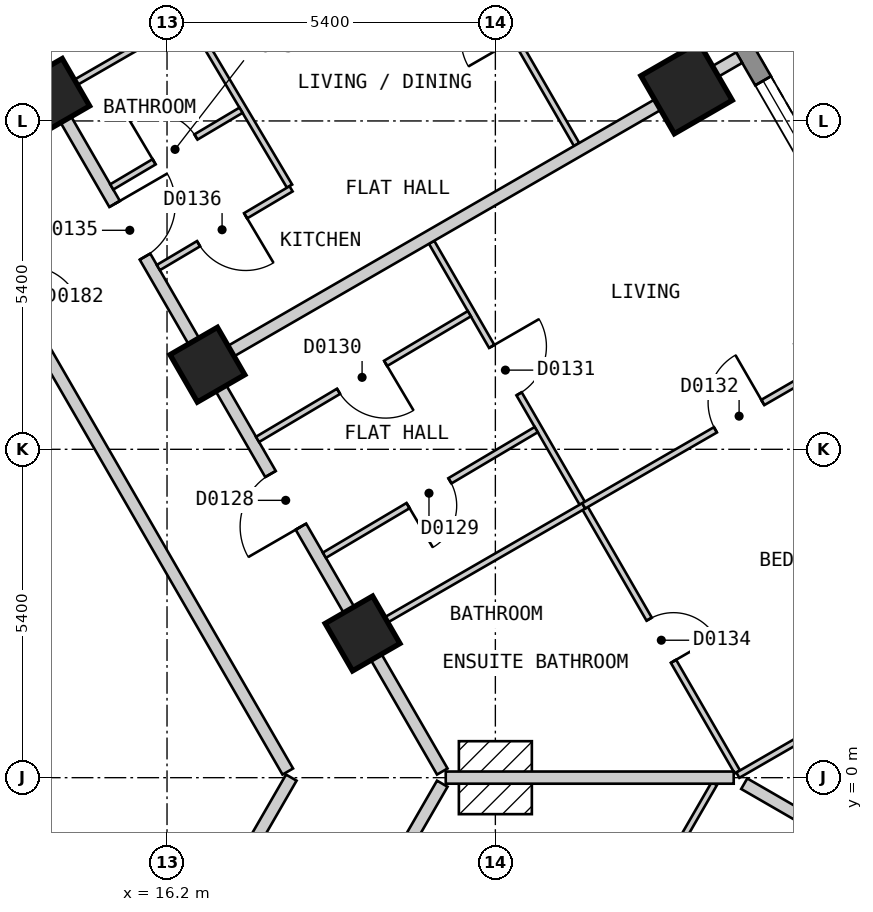
"""IFC4 building model, lengths in metres.
Left out: names, types, materials, properties, quantities, classifications, styles, units other than length and angle.
Written with IfcOpenShell. Run it as: python <this file> out.ifc"""

import sys

from ifc_helpers import new_model, si_unit, direction, frame, frame_2d, origin, origin_2d, place, context, subcontext, project, spatial, polyline, rectangle, outline, extrude, element, fill, save


model = new_model("IFC4")
c1 = context("Model", 3, precision=1e-05, world=origin(), true_north=direction((0.0, 1.0)))
c2 = subcontext(c1, "Body", "Model", "MODEL_VIEW")
j1 = project(units=[si_unit("LENGTHUNIT", "METRE"), si_unit("PLANEANGLEUNIT", "RADIAN")], contexts=[c1])
p1 = place(None, origin())
s1 = spatial("IfcSite", under=j1, at=p1, CompositionType="ELEMENT")
p2 = place(p1, origin())
s2 = spatial("IfcBuilding", under=s1, at=p2, CompositionType="ELEMENT")
p3 = place(p2, frame((0.0, 0.0, 23.4)))
s3 = spatial("IfcBuildingStorey", under=s2, at=p3, CompositionType="ELEMENT", Elevation=23.4)
p4 = place(p3, frame((24.745, 11.341, 0.0), z_axis=(0.0, 0.0, 1.0), x_axis=(-0.499984884929, 0.866034130299, 0.0)))
e1 = element("IfcColumn", 1, at=p4, inside=s3, PredefinedType="COLUMN", context=c2, shape_type="SweptSolid", body=[
    extrude(rectangle(XDim=1.1, YDim=1.1, at=origin_2d()), origin(), (0.0, 0.0, 1.0), 3.0),
])
for number, where, z_axis, x_axis in (
    (2, (19.416, 2.371, 0.0), (0.0, 0.0, 1.0), (-0.5, 0.866, 0.0)),
    (3, (16.864, 6.791, 0.0), (0.0, 0.0, 1.0), (-0.5, 0.866, 0.0)),
    (4, (14.312, 11.211, 0.0), (0.0, 0.0, 1.0), (-0.5, 0.866, 0.0)),
):
    element("IfcColumn", number, at=place(p3, frame(where, z_axis=z_axis, x_axis=x_axis)), inside=s3, PredefinedType="COLUMN", context=c2, shape_type="SweptSolid", body=[
        extrude(rectangle(XDim=0.9, YDim=0.9, at=origin_2d()), origin(), (0.0, 0.0, 1.0), 3.0),
    ])
p5 = place(p3, frame((31.22, 2.425, 0.0), z_axis=(0.0, 0.0, 1.0), x_axis=(-0.500001938803, 0.866024284413, 0.0)))
e5 = element("IfcWall", 5, at=p5, inside=s3, PredefinedType="SOLIDWALL", context=c2, shape_type="SweptSolid", body=[
    extrude(outline(polyline([(0.0, -0.15), (27.02, -0.15), (26.94, 0.15), (0.08, 0.15), (0.0, -0.15)])), origin(), (0.0, 0.0, 1.0), 2.7),
])
p6 = place(p5, frame((1.277, 0.0, 0.15)))
e6 = element("IfcOpeningElement", 6, at=p6, cuts=e5, PredefinedType="OPENING", context=c2, shape_type="SweptSolid", body=[
    extrude(rectangle(XDim=1.5, YDim=2.1, at=frame_2d((0.75, 1.05))), frame((0.0, 0.16, 0.0), z_axis=(0.0, -1.0, 0.0), x_axis=(1.0, 0.0, 0.0)), (0.0, 0.0, 1.0), 0.32),
])
p7 = place(p5, frame((3.829, 0.0, 0.15)))
e7 = element("IfcOpeningElement", 7, at=p7, cuts=e5, PredefinedType="OPENING", context=c2, shape_type="SweptSolid", body=[
    extrude(rectangle(XDim=1.5, YDim=2.1, at=frame_2d((0.75, 1.05))), frame((0.0, 0.16, 0.0), z_axis=(0.0, -1.0, 0.0), x_axis=(1.0, 0.0, 0.0)), (0.0, 0.0, 1.0), 0.32),
])
p8 = place(p5, frame((6.382, 0.0, 0.15)))
e8 = element("IfcOpeningElement", 8, at=p8, cuts=e5, PredefinedType="OPENING", context=c2, shape_type="SweptSolid", body=[
    extrude(rectangle(XDim=1.5, YDim=2.1, at=frame_2d((0.75, 1.05))), frame((0.0, 0.16, 0.0), z_axis=(0.0, -1.0, 0.0), x_axis=(1.0, 0.0, 0.0)), (0.0, 0.0, 1.0), 0.32),
])
p9 = place(p5, frame((8.933, 0.0, 0.15)))
e9 = element("IfcOpeningElement", 9, at=p9, cuts=e5, PredefinedType="OPENING", context=c2, shape_type="SweptSolid", body=[
    extrude(rectangle(XDim=1.5, YDim=2.1, at=frame_2d((0.75, 1.05))), frame((0.0, 0.16, 0.0), z_axis=(0.0, -1.0, 0.0), x_axis=(1.0, 0.0, 0.0)), (0.0, 0.0, 1.0), 0.32),
])
p10 = place(p5, frame((11.485, 0.0, 0.15)))
e10 = element("IfcOpeningElement", 10, at=p10, cuts=e5, PredefinedType="OPENING", context=c2, shape_type="SweptSolid", body=[
    extrude(rectangle(XDim=1.5, YDim=2.1, at=frame_2d((0.75, 1.05))), frame((0.0, 0.16, 0.0), z_axis=(0.0, -1.0, 0.0), x_axis=(1.0, 0.0, 0.0)), (0.0, 0.0, 1.0), 0.32),
])
p11 = place(p5, frame((14.037, 0.0, 0.15)))
e11 = element("IfcOpeningElement", 11, at=p11, cuts=e5, PredefinedType="OPENING", context=c2, shape_type="SweptSolid", body=[
    extrude(rectangle(XDim=1.5, YDim=2.1, at=frame_2d((0.75, 1.05))), frame((0.0, 0.16, 0.0), z_axis=(0.0, -1.0, 0.0), x_axis=(1.0, 0.0, 0.0)), (0.0, 0.0, 1.0), 0.32),
])
p12 = place(p5, frame((16.589, 0.0, 0.15)))
e12 = element("IfcOpeningElement", 12, at=p12, cuts=e5, PredefinedType="OPENING", context=c2, shape_type="SweptSolid", body=[
    extrude(rectangle(XDim=1.5, YDim=2.1, at=frame_2d((0.75, 1.05))), frame((0.0, 0.16, 0.0), z_axis=(0.0, -1.0, 0.0), x_axis=(1.0, 0.0, 0.0)), (0.0, 0.0, 1.0), 0.32),
])
p13 = place(p5, frame((19.141, 0.0, 0.15)))
e13 = element("IfcOpeningElement", 13, at=p13, cuts=e5, PredefinedType="OPENING", context=c2, shape_type="SweptSolid", body=[
    extrude(rectangle(XDim=1.5, YDim=2.1, at=frame_2d((0.75, 1.05))), frame((0.0, 0.16, 0.0), z_axis=(0.0, -1.0, 0.0), x_axis=(1.0, 0.0, 0.0)), (0.0, 0.0, 1.0), 0.32),
])
p14 = place(p5, frame((21.693, 0.0, 0.15)))
e14 = element("IfcOpeningElement", 14, at=p14, cuts=e5, PredefinedType="OPENING", context=c2, shape_type="SweptSolid", body=[
    extrude(rectangle(XDim=1.5, YDim=2.1, at=frame_2d((0.75, 1.05))), frame((0.0, 0.16, 0.0), z_axis=(0.0, -1.0, 0.0), x_axis=(1.0, 0.0, 0.0)), (0.0, 0.0, 1.0), 0.32),
])
p15 = place(p5, frame((24.244, 0.0, 0.15)))
e15 = element("IfcOpeningElement", 15, at=p15, cuts=e5, PredefinedType="OPENING", context=c2, shape_type="SweptSolid", body=[
    extrude(rectangle(XDim=1.5, YDim=2.1, at=frame_2d((0.75, 1.05))), frame((0.0, 0.16, 0.0), z_axis=(0.0, -1.0, 0.0), x_axis=(1.0, 0.0, 0.0)), (0.0, 0.0, 1.0), 0.32),
])
p16 = place(p3, frame((9.18, 15.7, 0.0), z_axis=(0.0, 0.0, 1.0), x_axis=(0.500003652032, -0.866023295272, 0.0)))
e16 = element("IfcWall", 16, at=p16, inside=s3, PredefinedType="PARTITIONING", context=c2, shape_type="SweptSolid", body=[
    extrude(rectangle(XDim=18.012, YDim=0.2, at=frame_2d((9.006, 0.0))), origin(), (0.0, 0.0, 1.0), 2.7),
])
p17 = place(p16, frame((8.556, 0.0, 0.0)))
e17 = element("IfcOpeningElement", 17, at=p17, cuts=e16, PredefinedType="OPENING", context=c2, shape_type="SweptSolid", body=[
    extrude(rectangle(XDim=0.9, YDim=2.1, at=frame_2d((0.45, 1.05))), frame((0.0, 0.11, 0.0), z_axis=(0.0, -1.0, 0.0), x_axis=(1.0, 0.0, 0.0)), (0.0, 0.0, 1.0), 0.22),
])
p18 = place(p3, frame((10.45, 17.9, 0.0), z_axis=(0.0, 0.0, 1.0), x_axis=(0.500034352617, -0.866005569383, 0.0)))
e18 = element("IfcWall", 18, at=p18, inside=s3, PredefinedType="PARTITIONING", context=c2, shape_type="SweptSolid", body=[
    extrude(rectangle(XDim=20.553, YDim=0.2, at=frame_2d((10.276, 0.0))), origin(), (0.0, 0.0, 1.0), 2.7),
])
p19 = place(p18, frame((14.903, 0.0, 0.0)))
e19 = element("IfcOpeningElement", 19, at=p19, cuts=e18, PredefinedType="OPENING", context=c2, shape_type="SweptSolid", body=[
    extrude(rectangle(XDim=1.0, YDim=2.1, at=frame_2d((0.5, 1.05))), frame((0.0, 0.11, 0.0), z_axis=(0.0, -1.0, 0.0), x_axis=(1.0, 0.0, 0.0)), (0.0, 0.0, 1.0), 0.22),
])
p20 = place(p18, frame((9.775, 0.0, 0.0)))
e20 = element("IfcOpeningElement", 20, at=p20, cuts=e18, PredefinedType="OPENING", context=c2, shape_type="SweptSolid", body=[
    extrude(rectangle(XDim=1.0, YDim=2.1, at=frame_2d((0.5, 1.05))), frame((0.0, 0.11, 0.0), z_axis=(0.0, -1.0, 0.0), x_axis=(1.0, 0.0, 0.0)), (0.0, 0.0, 1.0), 0.22),
])
p21 = place(p3, frame((15.6, -4.579, 0.0), z_axis=(0.0, 0.0, 1.0), x_axis=(0.499927597274, 0.866067201483, 0.0)))
e21 = element("IfcWall", 21, at=p21, inside=s3, PredefinedType="PARTITIONING", context=c2, shape_type="SweptSolid", body=[
    extrude(rectangle(XDim=5.288, YDim=0.2, at=frame_2d((2.644, 0.0))), origin(), (0.0, 0.0, 1.0), 2.7),
])
p22 = place(p3, frame((16.914, -6.703, 0.0), z_axis=(0.0, 0.0, 1.0), x_axis=(0.50003007663, 0.866008038338, 0.0)))
e22 = element("IfcWall", 22, at=p22, inside=s3, PredefinedType="PARTITIONING", context=c2, shape_type="SweptSolid", body=[
    extrude(rectangle(XDim=7.625, YDim=0.2, at=frame_2d((3.813, 0.0))), origin(), (0.0, 0.0, 1.0), 2.7),
])
p23 = place(p22, frame((1.952, 0.0, 0.0)))
e23 = element("IfcOpeningElement", 23, at=p23, cuts=e22, PredefinedType="OPENING", context=c2, shape_type="SweptSolid", body=[
    extrude(rectangle(XDim=1.0, YDim=2.1, at=frame_2d((0.5, 1.05))), frame((0.0, 0.11, 0.0), z_axis=(0.0, -1.0, 0.0), x_axis=(1.0, 0.0, 0.0)), (0.0, 0.0, 1.0), 0.22),
])
p24 = place(p3, frame((16.589, 12.468, 0.0), z_axis=(0.0, 0.0, 1.0), x_axis=(0.510331599186, -0.859977708358, 0.0)))
e24 = element("IfcWall", 24, at=p24, inside=s3, PredefinedType="PARTITIONING", context=c2, shape_type="SweptSolid", body=[
    extrude(rectangle(XDim=3.186, YDim=0.1, at=frame_2d((1.593, 0.0))), origin(), (0.0, 0.0, 1.0), 2.7),
])
p25 = place(p3, frame((20.551, 8.805, 0.0), z_axis=(0.0, 0.0, 1.0), x_axis=(0.499984387913, -0.86603441724, 0.0)))
e25 = element("IfcWall", 25, at=p25, inside=s3, PredefinedType="PARTITIONING", context=c2, shape_type="SweptSolid", body=[
    extrude(rectangle(XDim=10.058, YDim=0.1, at=frame_2d((5.029, 0.0))), origin(), (0.0, 0.0, 1.0), 2.7),
])
p26 = place(p25, frame((1.978, 0.0, 0.0)))
e26 = element("IfcOpeningElement", 26, at=p26, cuts=e25, PredefinedType="OPENING", context=c2, shape_type="SweptSolid", body=[
    extrude(rectangle(XDim=0.9, YDim=2.1, at=frame_2d((0.45, 1.05))), frame((0.0, 0.06, 0.0), z_axis=(0.0, -1.0, 0.0), x_axis=(1.0, 0.0, 0.0)), (0.0, 0.0, 1.0), 0.12),
])
p27 = place(p25, frame((7.157, 0.0, 0.0)))
e27 = element("IfcOpeningElement", 27, at=p27, cuts=e25, PredefinedType="OPENING", context=c2, shape_type="SweptSolid", body=[
    extrude(rectangle(XDim=0.8, YDim=2.1, at=frame_2d((0.4, 1.05))), frame((0.0, 0.06, 0.0), z_axis=(0.0, -1.0, 0.0), x_axis=(1.0, 0.0, 0.0)), (0.0, 0.0, 1.0), 0.12),
])
p28 = place(p3, frame((20.46, 14.703, 0.0), z_axis=(0.0, 0.0, 1.0), x_axis=(0.499903082856, -0.866081351693, 0.0)))
e28 = element("IfcWall", 28, at=p28, inside=s3, PredefinedType="PARTITIONING", context=c2, shape_type="SweptSolid", body=[
    extrude(rectangle(XDim=4.953, YDim=0.1, at=frame_2d((2.477, 0.0))), origin(), (0.0, 0.0, 1.0), 2.7),
])
p29 = place(p28, frame((2.052, 0.0, 0.0)))
e29 = element("IfcOpeningElement", 29, at=p29, cuts=e28, PredefinedType="OPENING", context=c2, shape_type="SweptSolid", body=[
    extrude(rectangle(XDim=0.9, YDim=2.1, at=frame_2d((0.45, 1.05))), frame((0.0, 0.06, 0.0), z_axis=(0.0, -1.0, 0.0), x_axis=(1.0, 0.0, 0.0)), (0.0, 0.0, 1.0), 0.12),
])
p30 = place(p3, frame((22.797, -4.263, 0.0), z_axis=(0.0, 0.0, 1.0), x_axis=(0.499820637322, 0.866128934112, 0.0)))
e30 = element("IfcWall", 30, at=p30, inside=s3, PredefinedType="PARTITIONING", context=c2, shape_type="SweptSolid", body=[
    extrude(rectangle(XDim=4.807, YDim=0.1, at=frame_2d((2.404, 0.0))), origin(), (0.0, 0.0, 1.0), 2.7),
])
p31 = place(p30, frame((2.037, 0.0, 0.0)))
e31 = element("IfcOpeningElement", 31, at=p31, cuts=e30, PredefinedType="OPENING", context=c2, shape_type="SweptSolid", body=[
    extrude(rectangle(XDim=0.8, YDim=2.1, at=frame_2d((0.4, 1.05))), frame((0.0, 0.06, 0.0), z_axis=(0.0, -1.0, 0.0), x_axis=(1.0, 0.0, 0.0)), (0.0, 0.0, 1.0), 0.12),
])
p32 = place(p3, frame((19.503, 2.421, 0.0), z_axis=(0.0, 0.0, 1.0), x_axis=(0.866083434238, 0.499899474834, 0.0)))
e32 = element("IfcWall", 32, at=p32, inside=s3, PredefinedType="PARTITIONING", context=c2, shape_type="SweptSolid", body=[
    extrude(rectangle(XDim=4.099, YDim=0.1, at=frame_2d((2.049, 0.0))), origin(), (0.0, 0.0, 1.0), 2.7),
])
p33 = place(p3, frame((25.588, 0.041, 0.0), z_axis=(0.0, 0.0, 1.0), x_axis=(0.866113484451, 0.499847408768, 0.0)))
e33 = element("IfcWall", 33, at=p33, inside=s3, PredefinedType="PARTITIONING", context=c2, shape_type="SweptSolid", body=[
    extrude(rectangle(XDim=5.92, YDim=0.1, at=frame_2d((2.96, 0.0))), origin(), (0.0, 0.0, 1.0), 2.7),
])
p34 = place(p33, frame((2.51, 0.0, 0.0)))
e34 = element("IfcOpeningElement", 34, at=p34, cuts=e33, PredefinedType="OPENING", context=c2, shape_type="SweptSolid", body=[
    extrude(rectangle(XDim=0.9, YDim=2.1, at=frame_2d((0.45, 1.05))), frame((0.0, 0.06, 0.0), z_axis=(0.0, -1.0, 0.0), x_axis=(1.0, 0.0, 0.0)), (0.0, 0.0, 1.0), 0.12),
])
p35 = place(p3, frame((14.399, 11.261, 0.0), z_axis=(0.0, 0.0, 1.0), x_axis=(0.866022959057, 0.500004234368, 0.0)))
e35 = element("IfcWall", 35, at=p35, inside=s3, PredefinedType="PARTITIONING", context=c2, shape_type="SweptSolid", body=[
    extrude(rectangle(XDim=10.0, YDim=0.1, at=frame_2d((5.0, 0.0))), origin(), (0.0, 0.0, 1.0), 2.7),
])
p36 = place(p35, frame((4.775, 0.0, 0.0)))
e36 = element("IfcOpeningElement", 36, at=p36, cuts=e35, PredefinedType="OPENING", context=c2, shape_type="SweptSolid", body=[
    extrude(rectangle(XDim=0.9, YDim=2.1, at=frame_2d((0.45, 1.05))), frame((0.0, 0.06, 0.0), z_axis=(0.0, -1.0, 0.0), x_axis=(1.0, 0.0, 0.0)), (0.0, 0.0, 1.0), 0.12),
])
p37 = place(p3, frame((17.688, 5.563, 0.0), z_axis=(0.0, 0.0, 1.0), x_axis=(0.860050619918, 0.510208713351, 0.0)))
e37 = element("IfcWall", 37, at=p37, inside=s3, PredefinedType="PARTITIONING", context=c2, shape_type="SweptSolid", body=[
    extrude(rectangle(XDim=4.051, YDim=0.1, at=frame_2d((2.025, 0.0))), origin(), (0.0, 0.0, 1.0), 2.7),
])
p38 = place(p37, frame((1.55, 0.0, 0.0)))
e38 = element("IfcOpeningElement", 38, at=p38, cuts=e37, PredefinedType="OPENING", context=c2, shape_type="SweptSolid", body=[
    extrude(rectangle(XDim=0.9, YDim=2.1, at=frame_2d((0.45, 1.05))), frame((0.0, 0.06, 0.0), z_axis=(0.0, -1.0, 0.0), x_axis=(1.0, 0.0, 0.0)), (0.0, 0.0, 1.0), 0.12),
])
p39 = place(p3, frame((18.788, 3.658, 0.0), z_axis=(0.0, 0.0, 1.0), x_axis=(0.860114269096, 0.510101405701, 0.0)))
e39 = element("IfcWall", 39, at=p39, inside=s3, PredefinedType="PARTITIONING", context=c2, shape_type="SweptSolid", body=[
    extrude(rectangle(XDim=4.051, YDim=0.1, at=frame_2d((2.025, 0.0))), origin(), (0.0, 0.0, 1.0), 2.7),
])
p40 = place(p39, frame((1.6, 0.0, 0.0)))
e40 = element("IfcOpeningElement", 40, at=p40, cuts=e39, PredefinedType="OPENING", context=c2, shape_type="SweptSolid", body=[
    extrude(rectangle(XDim=0.8, YDim=2.1, at=frame_2d((0.4, 1.05))), frame((0.0, 0.06, 0.0), z_axis=(0.0, -1.0, 0.0), x_axis=(1.0, 0.0, 0.0)), (0.0, 0.0, 1.0), 0.12),
])
p41 = place(p3, frame((16.057, 8.389, 0.0), z_axis=(0.0, 0.0, 1.0), x_axis=(0.860036770423, 0.510232058499, 0.0)))
e41 = element("IfcWall", 41, at=p41, inside=s3, PredefinedType="PARTITIONING", context=c2, shape_type="SweptSolid", body=[
    extrude(rectangle(XDim=2.538, YDim=0.1, at=frame_2d((1.269, 0.0))), origin(), (0.0, 0.0, 1.0), 2.7),
])
p42 = place(p41, frame((0.769, 0.0, 0.0)))
e42 = element("IfcOpeningElement", 42, at=p42, cuts=e41, PredefinedType="OPENING", context=c2, shape_type="SweptSolid", body=[
    extrude(rectangle(XDim=0.9, YDim=2.1, at=frame_2d((0.45, 1.05))), frame((0.0, 0.06, 0.0), z_axis=(0.0, -1.0, 0.0), x_axis=(1.0, 0.0, 0.0)), (0.0, 0.0, 1.0), 0.12),
])
p43 = place(p3, frame((15.291, 9.715, 0.0), z_axis=(0.0, 0.0, 1.0), x_axis=(0.860087708271, 0.510146188932, 0.0)))
e43 = element("IfcWall", 43, at=p43, inside=s3, PredefinedType="PARTITIONING", context=c2, shape_type="SweptSolid", body=[
    extrude(rectangle(XDim=2.472, YDim=0.1, at=frame_2d((1.236, 0.0))), origin(), (0.0, 0.0, 1.0), 2.7),
])
p44 = place(p43, frame((0.81, 0.0, 0.0)))
e44 = element("IfcOpeningElement", 44, at=p44, cuts=e43, PredefinedType="OPENING", context=c2, shape_type="SweptSolid", body=[
    extrude(rectangle(XDim=0.8, YDim=2.1, at=frame_2d((0.4, 1.05))), frame((0.0, 0.06, 0.0), z_axis=(0.0, -1.0, 0.0), x_axis=(1.0, 0.0, 0.0)), (0.0, 0.0, 1.0), 0.12),
])
p45 = place(p3, frame((25.693, -0.099, 0.0), z_axis=(0.0, 0.0, 1.0), x_axis=(0.866032775405, -0.499987231761, 0.0)))
e45 = element("IfcWall", 45, at=p45, inside=s3, PredefinedType="PARTITIONING", context=c2, shape_type="SweptSolid", body=[
    extrude(rectangle(XDim=5.8, YDim=0.2, at=frame_2d((2.9, 0.0))), origin(), (0.0, 0.0, 1.0), 2.7),
])
p46 = place(p3, frame((20.784, 0.001, 0.0), z_axis=(0.0, 0.0, 1.0), x_axis=(1.0, 0.0, 0.0)))
e46 = element("IfcWall", 46, at=p46, inside=s3, PredefinedType="PARTITIONING", context=c2, shape_type="SweptSolid", body=[
    extrude(rectangle(XDim=4.736, YDim=0.2, at=frame_2d((2.368, 0.0))), origin(), (0.0, 0.0, 1.0), 2.7),
])
p47 = place(p3, frame((16.95, 6.841, 0.0), z_axis=(0.0, 0.0, 1.0), x_axis=(0.866022959057, 0.500004234368, 0.0)))
e47 = element("IfcWall", 47, at=p47, inside=s3, PredefinedType="PARTITIONING", context=c2, shape_type="SweptSolid", body=[
    extrude(rectangle(XDim=10.0, YDim=0.2, at=frame_2d((5.0, 0.0))), origin(), (0.0, 0.0, 1.0), 2.7),
])
p48 = place(p3, frame((23.053, 4.47, 0.0), z_axis=(0.0, 0.0, 1.0), x_axis=(0.866052608538, 0.499952877023, 0.0)))
e48 = element("IfcWall", 48, at=p48, inside=s3, PredefinedType="PARTITIONING", context=c2, shape_type="SweptSolid", body=[
    extrude(rectangle(XDim=5.9, YDim=0.1, at=frame_2d((2.95, 0.0))), origin(), (0.0, 0.0, 1.0), 2.7),
])
p49 = place(p48, frame((2.501, 0.0, 0.0)))
e49 = element("IfcOpeningElement", 49, at=p49, cuts=e48, PredefinedType="OPENING", context=c2, shape_type="SweptSolid", body=[
    extrude(rectangle(XDim=0.9, YDim=2.1, at=frame_2d((0.45, 1.05))), frame((0.0, 0.06, 0.0), z_axis=(0.0, -1.0, 0.0), x_axis=(1.0, 0.0, 0.0)), (0.0, 0.0, 1.0), 0.12),
])
p50 = place(p9, origin())
e50 = element("IfcWindow", 50, at=p50, inside=s3, PartitioningType="SINGLE_PANEL", PredefinedType="WINDOW", context=c2, shape_type="SweptSolid", body=[
    extrude(rectangle(XDim=1.5, YDim=2.1, at=frame_2d((0.75, 1.05))), frame((0.0, 0.03, 0.0), z_axis=(0.0, -1.0, 0.0), x_axis=(1.0, 0.0, 0.0)), (0.0, 0.0, 1.0), 0.06),
])
fill(e9, e50)
p51 = place(p19, origin())
e51 = element("IfcDoor", 51, at=p51, inside=s3, OperationType="SINGLE_SWING_RIGHT", PredefinedType="DOOR", context=c2, shape_type="SweptSolid", body=[
    extrude(rectangle(XDim=1.0, YDim=2.1, at=frame_2d((0.5, 1.05))), frame((0.0, 0.025, 0.0), z_axis=(0.0, -1.0, 0.0), x_axis=(1.0, 0.0, 0.0)), (0.0, 0.0, 1.0), 0.05),
])
fill(e19, e51)
p52 = place(p40, origin())
e52 = element("IfcDoor", 52, at=p52, inside=s3, OperationType="SINGLE_SWING_LEFT", PredefinedType="DOOR", context=c2, shape_type="SweptSolid", body=[
    extrude(rectangle(XDim=0.8, YDim=2.1, at=frame_2d((0.4, 1.05))), frame((0.0, 0.025, 0.0), z_axis=(0.0, -1.0, 0.0), x_axis=(1.0, 0.0, 0.0)), (0.0, 0.0, 1.0), 0.05),
])
fill(e40, e52)
p53 = place(p38, origin())
e53 = element("IfcDoor", 53, at=p53, inside=s3, OperationType="SINGLE_SWING_RIGHT", PredefinedType="DOOR", context=c2, shape_type="SweptSolid", body=[
    extrude(rectangle(XDim=0.9, YDim=2.1, at=frame_2d((0.45, 1.05))), frame((0.0, 0.025, 0.0), z_axis=(0.0, -1.0, 0.0), x_axis=(1.0, 0.0, 0.0)), (0.0, 0.0, 1.0), 0.05),
])
fill(e38, e53)
p54 = place(p26, origin())
e54 = element("IfcDoor", 54, at=p54, inside=s3, OperationType="SINGLE_SWING_LEFT", PredefinedType="DOOR", context=c2, shape_type="SweptSolid", body=[
    extrude(rectangle(XDim=0.9, YDim=2.1, at=frame_2d((0.45, 1.05))), frame((0.0, 0.025, 0.0), z_axis=(0.0, -1.0, 0.0), x_axis=(1.0, 0.0, 0.0)), (0.0, 0.0, 1.0), 0.05),
])
fill(e26, e54)
p55 = place(p49, origin())
e55 = element("IfcDoor", 55, at=p55, inside=s3, OperationType="SINGLE_SWING_RIGHT", PredefinedType="DOOR", context=c2, shape_type="SweptSolid", body=[
    extrude(rectangle(XDim=0.9, YDim=2.1, at=frame_2d((0.45, 1.05))), frame((0.0, 0.025, 0.0), z_axis=(0.0, -1.0, 0.0), x_axis=(1.0, 0.0, 0.0)), (0.0, 0.0, 1.0), 0.05),
])
fill(e49, e55)
p56 = place(p27, origin())
e56 = element("IfcDoor", 56, at=p56, inside=s3, OperationType="SINGLE_SWING_RIGHT", PredefinedType="DOOR", context=c2, shape_type="SweptSolid", body=[
    extrude(rectangle(XDim=0.8, YDim=2.1, at=frame_2d((0.4, 1.05))), frame((0.0, 0.025, 0.0), z_axis=(0.0, -1.0, 0.0), x_axis=(1.0, 0.0, 0.0)), (0.0, 0.0, 1.0), 0.05),
])
fill(e27, e56)
p57 = place(p20, origin())
e57 = element("IfcDoor", 57, at=p57, inside=s3, OperationType="SINGLE_SWING_LEFT", PredefinedType="DOOR", context=c2, shape_type="SweptSolid", body=[
    extrude(rectangle(XDim=1.0, YDim=2.1, at=frame_2d((0.5, 1.05))), frame((0.0, 0.025, 0.0), z_axis=(0.0, -1.0, 0.0), x_axis=(1.0, 0.0, 0.0)), (0.0, 0.0, 1.0), 0.05),
])
fill(e20, e57)
p58 = place(p42, origin())
e58 = element("IfcDoor", 58, at=p58, inside=s3, OperationType="SINGLE_SWING_RIGHT", PredefinedType="DOOR", context=c2, shape_type="SweptSolid", body=[
    extrude(rectangle(XDim=0.9, YDim=2.1, at=frame_2d((0.45, 1.05))), frame((0.0, 0.025, 0.0), z_axis=(0.0, -1.0, 0.0), x_axis=(1.0, 0.0, 0.0)), (0.0, 0.0, 1.0), 0.05),
])
fill(e42, e58)
p59 = place(p44, origin())
e59 = element("IfcDoor", 59, at=p59, inside=s3, OperationType="SINGLE_SWING_LEFT", PredefinedType="DOOR", context=c2, shape_type="SweptSolid", body=[
    extrude(rectangle(XDim=0.8, YDim=2.1, at=frame_2d((0.4, 1.05))), frame((0.0, 0.025, 0.0), z_axis=(0.0, -1.0, 0.0), x_axis=(1.0, 0.0, 0.0)), (0.0, 0.0, 1.0), 0.05),
])
fill(e44, e59)
save(model, sys.argv[1])
